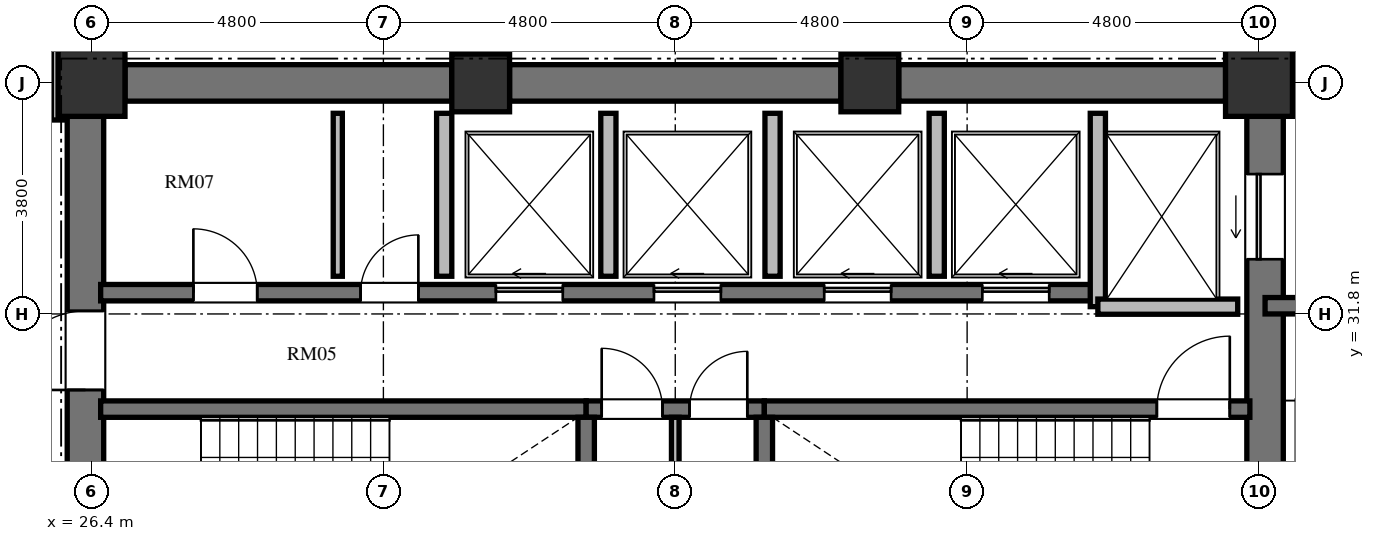
"""IFC4 building model, lengths in metres.
Left out: names, types, materials, properties, quantities, classifications, styles, units other than length and angle.
Written with IfcOpenShell. Run it as: python <this file> out.ifc"""

import sys

from ifc_helpers import new_model, si_unit, direction, frame, frame_2d, origin, origin_2d, place, context, subcontext, project, spatial, rectangle, extrude, element, fill, save


model = new_model("IFC4")
c1 = context("Model", 3, precision=1e-05, world=origin(), true_north=direction((0.0, 1.0)))
c2 = subcontext(c1, "Body", "Model", "MODEL_VIEW")
j1 = project(units=[si_unit("LENGTHUNIT", "METRE"), si_unit("PLANEANGLEUNIT", "RADIAN")], contexts=[c1])
p1 = place(None, origin())
s1 = spatial("IfcSite", under=j1, at=p1, CompositionType="ELEMENT")
p2 = place(p1, origin())
s2 = spatial("IfcBuilding", under=s1, at=p2, CompositionType="ELEMENT")
p3 = place(p2, frame((0.0, 0.0, 182.064)))
s3 = spatial("IfcBuildingStorey", under=s2, at=p3, CompositionType="ELEMENT", Elevation=182.064)
p4 = place(p3, frame((45.6, 35.6, 0.0), z_axis=(0.0, 0.0, 1.0), x_axis=(1.0, 0.0, 0.0)))
e1 = element("IfcColumn", 1, at=p4, inside=s3, PredefinedType="COLUMN", context=c2, shape_type="SweptSolid", body=[
    extrude(rectangle(XDim=1.1, YDim=1.1, at=origin_2d()), origin(), (0.0, 0.0, 1.0), 3.648),
])
for number, where, z_axis, x_axis in (
    (2, (39.2, 35.6, 0.0), (0.0, 0.0, 1.0), (1.0, 0.0, 0.0)),
    (3, (32.8, 35.6, 0.0), (0.0, 0.0, 1.0), (1.0, 0.0, 0.0)),
):
    element("IfcColumn", number, at=place(p3, frame(where, z_axis=z_axis, x_axis=x_axis)), inside=s3, PredefinedType="COLUMN", context=c2, shape_type="SweptSolid", body=[
        extrude(rectangle(XDim=0.95, YDim=0.95, at=origin_2d()), origin(), (0.0, 0.0, 1.0), 3.648),
    ])
p5 = place(p3, frame((26.4, 35.6, 0.0), z_axis=(0.0, 0.0, 1.0), x_axis=(1.0, 0.0, 0.0)))
e4 = element("IfcColumn", 4, at=p5, inside=s3, PredefinedType="COLUMN", context=c2, shape_type="SweptSolid", body=[
    extrude(rectangle(XDim=1.1, YDim=1.1, at=origin_2d()), origin(), (0.0, 0.0, 1.0), 3.648),
])
p6 = place(p3, frame((26.3, 20.95, 0.0), z_axis=(0.0, 0.0, 1.0), x_axis=(0.0, 1.0, 0.0)))
e5 = element("IfcWall", 5, at=p6, inside=s3, PredefinedType="SHEAR", context=c2, shape_type="SweptSolid", body=[
    extrude(rectangle(XDim=14.1, YDim=0.6, at=frame_2d((7.05, 0.0))), origin(), (0.0, 0.0, 1.0), 3.648),
])
p7 = place(p6, frame((6.5, 0.0, 0.0)))
e6 = element("IfcOpeningElement", 6, at=p7, cuts=e5, PredefinedType="OPENING", context=c2, shape_type="SweptSolid", body=[
    extrude(rectangle(XDim=1.2, YDim=2.15, at=frame_2d((0.6, 1.075))), frame((0.0, 0.31, 0.0), z_axis=(0.0, -1.0, 0.0), x_axis=(1.0, 0.0, 0.0)), (0.0, 0.0, 1.0), 0.62),
])
p8 = place(p6, frame((9.6, 0.0, 0.0)))
e7 = element("IfcOpeningElement", 7, at=p8, cuts=e5, PredefinedType="OPENING", context=c2, shape_type="SweptSolid", body=[
    extrude(rectangle(XDim=1.3, YDim=2.2, at=frame_2d((0.65, 1.1))), frame((0.0, 0.31, 0.0), z_axis=(0.0, -1.0, 0.0), x_axis=(1.0, 0.0, 0.0)), (0.0, 0.0, 1.0), 0.62),
])
p9 = place(p6, frame((3.26, 0.0, 0.0)))
e8 = element("IfcOpeningElement", 8, at=p9, cuts=e5, PredefinedType="OPENING", context=c2, shape_type="SweptSolid", body=[
    extrude(rectangle(XDim=1.3, YDim=2.2, at=frame_2d((0.65, 1.1))), frame((0.0, 0.31, 0.0), z_axis=(0.0, -1.0, 0.0), x_axis=(1.0, 0.0, 0.0)), (0.0, 0.0, 1.0), 0.62),
])
p10 = place(p3, frame((45.7, 20.95, 0.0), z_axis=(0.0, 0.0, 1.0), x_axis=(0.0, 1.0, 0.0)))
e9 = element("IfcWall", 9, at=p10, inside=s3, PredefinedType="SHEAR", context=c2, shape_type="SweptSolid", body=[
    extrude(rectangle(XDim=14.1, YDim=0.6, at=frame_2d((7.05, 0.0))), origin(), (0.0, 0.0, 1.0), 3.648),
])
p11 = place(p10, frame((11.75, 0.0, 0.0)))
e10 = element("IfcOpeningElement", 10, at=p11, cuts=e9, PredefinedType="OPENING", context=c2, shape_type="SweptSolid", body=[
    extrude(rectangle(XDim=1.4, YDim=2.3, at=frame_2d((0.7, 1.15))), frame((0.0, 0.31, 0.0), z_axis=(0.0, -1.0, 0.0), x_axis=(1.0, 0.0, 0.0)), (0.0, 0.0, 1.0), 0.62),
])
p12 = place(p10, frame((0.95, 0.0, 0.0)))
e11 = element("IfcOpeningElement", 11, at=p12, cuts=e9, PredefinedType="OPENING", context=c2, shape_type="SweptSolid", body=[
    extrude(rectangle(XDim=1.4, YDim=2.3, at=frame_2d((0.7, 1.15))), frame((0.0, 0.31, 0.0), z_axis=(0.0, -1.0, 0.0), x_axis=(1.0, 0.0, 0.0)), (0.0, 0.0, 1.0), 0.62),
])
p13 = place(p3, frame((26.95, 35.6, 0.0), z_axis=(0.0, 0.0, 1.0), x_axis=(1.0, 0.0, 0.0)))
e12 = element("IfcWall", 12, at=p13, inside=s3, PredefinedType="SHEAR", context=c2, shape_type="SweptSolid", body=[
    extrude(rectangle(XDim=5.375, YDim=0.6, at=frame_2d((2.688, 0.0))), origin(), (0.0, 0.0, 1.0), 3.648),
])
p14 = place(p3, frame((33.275, 35.6, 0.0), z_axis=(0.0, 0.0, 1.0), x_axis=(1.0, 0.0, 0.0)))
e13 = element("IfcWall", 13, at=p14, inside=s3, PredefinedType="SHEAR", context=c2, shape_type="SweptSolid", body=[
    extrude(rectangle(XDim=5.45, YDim=0.6, at=frame_2d((2.725, 0.0))), origin(), (0.0, 0.0, 1.0), 3.648),
])
p15 = place(p3, frame((39.675, 35.6, 0.0), z_axis=(0.0, 0.0, 1.0), x_axis=(1.0, 0.0, 0.0)))
e14 = element("IfcWall", 14, at=p15, inside=s3, PredefinedType="SHEAR", context=c2, shape_type="SweptSolid", body=[
    extrude(rectangle(XDim=5.375, YDim=0.6, at=frame_2d((2.688, 0.0))), origin(), (0.0, 0.0, 1.0), 3.648),
])
p16 = place(p3, frame((26.55, 30.235, 0.0), z_axis=(0.0, 0.0, 1.0), x_axis=(1.0, 0.0, 0.0)))
e15 = element("IfcWall", 15, at=p16, inside=s3, PredefinedType="SHEAR", context=c2, shape_type="SweptSolid", body=[
    extrude(rectangle(XDim=7.985, YDim=0.27, at=frame_2d((3.992, 0.0))), origin(), (0.0, 0.0, 1.0), 3.648),
])
p17 = place(p3, frame((34.535, 30.235, 0.0), z_axis=(0.0, 0.0, 1.0), x_axis=(1.0, 0.0, 0.0)))
e16 = element("IfcWall", 16, at=p17, inside=s3, PredefinedType="SHEAR", context=c2, shape_type="SweptSolid", body=[
    extrude(rectangle(XDim=2.93, YDim=0.27, at=frame_2d((1.465, 0.0))), origin(), (0.0, 0.0, 1.0), 3.648),
])
p18 = place(p17, frame((0.255, 0.0, 0.0)))
e17 = element("IfcOpeningElement", 17, at=p18, cuts=e16, PredefinedType="OPENING", context=c2, shape_type="SweptSolid", body=[
    extrude(rectangle(XDim=1.0, YDim=2.1, at=frame_2d((0.5, 1.05))), frame((0.0, 0.145, 0.0), z_axis=(0.0, -1.0, 0.0), x_axis=(1.0, 0.0, 0.0)), (0.0, 0.0, 1.0), 0.29),
])
p19 = place(p17, frame((1.7, 0.0, 0.0)))
e18 = element("IfcOpeningElement", 18, at=p19, cuts=e16, PredefinedType="OPENING", context=c2, shape_type="SweptSolid", body=[
    extrude(rectangle(XDim=0.95, YDim=2.1, at=frame_2d((0.475, 1.05))), frame((0.0, 0.145, 0.0), z_axis=(0.0, -1.0, 0.0), x_axis=(1.0, 0.0, 0.0)), (0.0, 0.0, 1.0), 0.29),
])
p20 = place(p3, frame((37.465, 30.235, 0.0), z_axis=(0.0, 0.0, 1.0), x_axis=(1.0, 0.0, 0.0)))
e19 = element("IfcWall", 19, at=p20, inside=s3, PredefinedType="SHEAR", context=c2, shape_type="SweptSolid", body=[
    extrude(rectangle(XDim=7.985, YDim=0.27, at=frame_2d((3.992, 0.0))), origin(), (0.0, 0.0, 1.0), 3.648),
])
p21 = place(p20, frame((6.455, 0.0, 0.0)))
e20 = element("IfcOpeningElement", 20, at=p21, cuts=e19, PredefinedType="OPENING", context=c2, shape_type="SweptSolid", body=[
    extrude(rectangle(XDim=1.2, YDim=2.15, at=frame_2d((0.6, 1.075))), frame((0.0, 0.145, 0.0), z_axis=(0.0, -1.0, 0.0), x_axis=(1.0, 0.0, 0.0)), (0.0, 0.0, 1.0), 0.29),
])
for number, where, z_axis, x_axis in (
    (21, (34.535, 26.02, 0.0), (0.0, 0.0, 1.0), (0.0, 1.0, 0.0)),
    (22, (37.465, 26.02, 0.0), (0.0, 0.0, 1.0), (0.0, 1.0, 0.0)),
):
    element("IfcWall", number, at=place(p3, frame(where, z_axis=z_axis, x_axis=x_axis)), inside=s3, PredefinedType="SHEAR", context=c2, shape_type="SweptSolid", body=[
        extrude(rectangle(XDim=4.08, YDim=0.27, at=frame_2d((2.04, 0.0))), origin(), (0.0, 0.0, 1.0), 3.648),
    ])
p22 = place(p3, frame((36.0, 26.02, 0.0), z_axis=(0.0, 0.0, 1.0), x_axis=(0.0, 1.0, 0.0)))
e23 = element("IfcWall", 23, at=p22, inside=s3, PredefinedType="PARTITIONING", context=c2, shape_type="SweptSolid", body=[
    extrude(rectangle(XDim=4.08, YDim=0.125, at=frame_2d((2.04, 0.0))), origin(), (0.0, 0.0, 1.0), 3.428),
])
p23 = place(p3, frame((26.55, 32.15, 0.0), z_axis=(0.0, 0.0, 1.0), x_axis=(1.0, 0.0, 0.0)))
e24 = element("IfcWall", 24, at=p23, inside=s3, PredefinedType="SHEAR", context=c2, shape_type="SweptSolid", body=[
    extrude(rectangle(XDim=16.4, YDim=0.27, at=frame_2d((8.2, 0.0))), origin(), (0.0, 0.0, 1.0), 3.648),
])
p24 = place(p23, frame((1.525, 0.0, 0.0)))
e25 = element("IfcOpeningElement", 25, at=p24, cuts=e24, PredefinedType="OPENING", context=c2, shape_type="SweptSolid", body=[
    extrude(rectangle(XDim=1.05, YDim=2.15, at=frame_2d((0.525, 1.075))), frame((0.0, 0.145, 0.0), z_axis=(0.0, -1.0, 0.0), x_axis=(1.0, 0.0, 0.0)), (0.0, 0.0, 1.0), 0.29),
])
p25 = place(p23, frame((4.275, 0.0, 0.0)))
e26 = element("IfcOpeningElement", 26, at=p25, cuts=e24, PredefinedType="OPENING", context=c2, shape_type="SweptSolid", body=[
    extrude(rectangle(XDim=0.95, YDim=2.1, at=frame_2d((0.475, 1.05))), frame((0.0, 0.145, 0.0), z_axis=(0.0, -1.0, 0.0), x_axis=(1.0, 0.0, 0.0)), (0.0, 0.0, 1.0), 0.29),
])
p26 = place(p23, frame((6.5, 0.0, 0.0)))
e27 = element("IfcOpeningElement", 27, at=p26, cuts=e24, PredefinedType="OPENING", context=c2, shape_type="SweptSolid", body=[
    extrude(rectangle(XDim=1.1, YDim=2.2, at=frame_2d((0.55, 1.1))), frame((0.0, 0.145, 0.0), z_axis=(0.0, -1.0, 0.0), x_axis=(1.0, 0.0, 0.0)), (0.0, 0.0, 1.0), 0.29),
])
p27 = place(p23, frame((9.1, 0.0, 0.0)))
e28 = element("IfcOpeningElement", 28, at=p27, cuts=e24, PredefinedType="OPENING", context=c2, shape_type="SweptSolid", body=[
    extrude(rectangle(XDim=1.1, YDim=2.2, at=frame_2d((0.55, 1.1))), frame((0.0, 0.145, 0.0), z_axis=(0.0, -1.0, 0.0), x_axis=(1.0, 0.0, 0.0)), (0.0, 0.0, 1.0), 0.29),
])
p28 = place(p23, frame((11.9, 0.0, 0.0)))
e29 = element("IfcOpeningElement", 29, at=p28, cuts=e24, PredefinedType="OPENING", context=c2, shape_type="SweptSolid", body=[
    extrude(rectangle(XDim=1.1, YDim=2.2, at=frame_2d((0.55, 1.1))), frame((0.0, 0.145, 0.0), z_axis=(0.0, -1.0, 0.0), x_axis=(1.0, 0.0, 0.0)), (0.0, 0.0, 1.0), 0.29),
])
p29 = place(p23, frame((14.5, 0.0, 0.0)))
e30 = element("IfcOpeningElement", 30, at=p29, cuts=e24, PredefinedType="OPENING", context=c2, shape_type="SweptSolid", body=[
    extrude(rectangle(XDim=1.1, YDim=2.2, at=frame_2d((0.55, 1.1))), frame((0.0, 0.145, 0.0), z_axis=(0.0, -1.0, 0.0), x_axis=(1.0, 0.0, 0.0)), (0.0, 0.0, 1.0), 0.29),
])
p30 = place(p3, frame((42.95, 31.92, 0.0), z_axis=(0.0, 0.0, 1.0), x_axis=(0.0, 1.0, 0.0)))
e31 = element("IfcWall", 31, at=p30, inside=s3, PredefinedType="SOLIDWALL", context=c2, shape_type="SweptSolid", body=[
    extrude(rectangle(XDim=3.18, YDim=0.25, at=frame_2d((1.59, 0.0))), origin(), (0.0, 0.0, 1.0), 3.428),
])
p31 = place(p3, frame((42.95, 31.92, 0.0), z_axis=(0.0, 0.0, 1.0), x_axis=(1.0, 0.0, 0.0)))
e32 = element("IfcWall", 32, at=p31, inside=s3, PredefinedType="SOLIDWALL", context=c2, shape_type="SweptSolid", body=[
    extrude(rectangle(XDim=2.3, YDim=0.25, at=frame_2d((1.15, 0.0))), origin(), (0.0, 0.0, 1.0), 3.428),
])
for number, where, z_axis, x_axis in (
    (33, (32.2, 32.42, 0.0), (0.0, 0.0, 1.0), (0.0, 1.0, 0.0)),
    (34, (34.9, 32.42, 0.0), (0.0, 0.0, 1.0), (0.0, 1.0, 0.0)),
    (35, (37.6, 32.42, 0.0), (0.0, 0.0, 1.0), (0.0, 1.0, 0.0)),
    (36, (40.3, 32.42, 0.0), (0.0, 0.0, 1.0), (0.0, 1.0, 0.0)),
):
    element("IfcWall", number, at=place(p3, frame(where, z_axis=z_axis, x_axis=x_axis)), inside=s3, PredefinedType="SOLIDWALL", context=c2, shape_type="SweptSolid", body=[
        extrude(rectangle(XDim=2.68, YDim=0.25, at=frame_2d((1.34, 0.0))), origin(), (0.0, 0.0, 1.0), 3.428),
    ])
p32 = place(p3, frame((30.45, 32.42, 0.0), z_axis=(0.0, 0.0, 1.0), x_axis=(0.0, 1.0, 0.0)))
e37 = element("IfcWall", 37, at=p32, inside=s3, PredefinedType="PARTITIONING", context=c2, shape_type="SweptSolid", body=[
    extrude(rectangle(XDim=2.68, YDim=0.15, at=frame_2d((1.34, 0.0))), origin(), (0.0, 0.0, 1.0), 3.428),
])
p33 = place(p3, frame((46.0, 35.98, 0.0), z_axis=(0.0, 0.0, 1.0), x_axis=(1.0, 0.0, 0.0)))
e38 = element("IfcWall", 38, at=p33, inside=s3, PredefinedType="SHEAR", context=c2, shape_type="SweptSolid", body=[
    extrude(rectangle(XDim=4.55, YDim=0.27, at=frame_2d((2.275, 0.0))), origin(), (0.0, 0.0, 1.0), 3.648),
])
p34 = place(p3, frame((45.7, 31.935, 0.0), z_axis=(0.0, 0.0, 1.0), x_axis=(1.0, 0.0, 0.0)))
e39 = element("IfcWall", 39, at=p34, inside=s3, PredefinedType="SHEAR", context=c2, shape_type="SweptSolid", body=[
    extrude(rectangle(XDim=4.715, YDim=0.27, at=frame_2d((2.357, 0.0))), origin(), (0.0, 0.0, 1.0), 3.648),
])
p35 = place(p3, frame((25.83, 36.21, 0.0), z_axis=(0.0, 0.0, 1.0), x_axis=(0.0, -1.0, 0.0)))
e40 = element("IfcWall", 40, at=p35, inside=s3, PredefinedType="PARTITIONING", context=c2, shape_type="SweptSolid", body=[
    extrude(rectangle(XDim=1.22, YDim=0.18, at=frame_2d((0.61, 0.0))), origin(), (0.0, 0.0, 1.0), 3.428),
])
p36 = place(p21, origin())
e41 = element("IfcDoor", 41, at=p36, inside=s3, OperationType="SINGLE_SWING_RIGHT", PredefinedType="DOOR", context=c2, shape_type="SweptSolid", body=[
    extrude(rectangle(XDim=1.2, YDim=2.15, at=frame_2d((0.6, 1.075))), frame((0.0, 0.025, 0.0), z_axis=(0.0, -1.0, 0.0), x_axis=(1.0, 0.0, 0.0)), (0.0, 0.0, 1.0), 0.05),
])
fill(e20, e41)
p37 = place(p18, origin())
e42 = element("IfcDoor", 42, at=p37, inside=s3, OperationType="SINGLE_SWING_LEFT", PredefinedType="DOOR", context=c2, shape_type="SweptSolid", body=[
    extrude(rectangle(XDim=1.0, YDim=2.1, at=frame_2d((0.5, 1.05))), frame((0.0, 0.025, 0.0), z_axis=(0.0, -1.0, 0.0), x_axis=(1.0, 0.0, 0.0)), (0.0, 0.0, 1.0), 0.05),
])
fill(e17, e42)
p38 = place(p19, origin())
e43 = element("IfcDoor", 43, at=p38, inside=s3, OperationType="SINGLE_SWING_RIGHT", PredefinedType="DOOR", context=c2, shape_type="SweptSolid", body=[
    extrude(rectangle(XDim=0.95, YDim=2.1, at=frame_2d((0.475, 1.05))), frame((0.0, 0.025, 0.0), z_axis=(0.0, -1.0, 0.0), x_axis=(1.0, 0.0, 0.0)), (0.0, 0.0, 1.0), 0.05),
])
fill(e18, e43)
p39 = place(p8, origin())
e44 = element("IfcDoor", 44, at=p39, inside=s3, OperationType="SINGLE_SWING_LEFT", PredefinedType="DOOR", context=c2, shape_type="SweptSolid", body=[
    extrude(rectangle(XDim=1.3, YDim=2.2, at=frame_2d((0.65, 1.1))), frame((0.0, 0.025, 0.0), z_axis=(0.0, -1.0, 0.0), x_axis=(1.0, 0.0, 0.0)), (0.0, 0.0, 1.0), 0.05),
])
fill(e7, e44)
p40 = place(p24, origin())
e45 = element("IfcDoor", 45, at=p40, inside=s3, OperationType="SINGLE_SWING_LEFT", PredefinedType="DOOR", context=c2, shape_type="SweptSolid", body=[
    extrude(rectangle(XDim=1.05, YDim=2.15, at=frame_2d((0.525, 1.075))), frame((0.0, 0.025, 0.0), z_axis=(0.0, -1.0, 0.0), x_axis=(1.0, 0.0, 0.0)), (0.0, 0.0, 1.0), 0.05),
])
fill(e25, e45)
p41 = place(p25, origin())
e46 = element("IfcDoor", 46, at=p41, inside=s3, OperationType="SINGLE_SWING_RIGHT", PredefinedType="DOOR", context=c2, shape_type="SweptSolid", body=[
    extrude(rectangle(XDim=0.95, YDim=2.1, at=frame_2d((0.475, 1.05))), frame((0.0, 0.025, 0.0), z_axis=(0.0, -1.0, 0.0), x_axis=(1.0, 0.0, 0.0)), (0.0, 0.0, 1.0), 0.05),
])
fill(e26, e46)
p42 = place(p26, origin())
e47 = element("IfcDoor", 47, at=p42, inside=s3, OperationType="SLIDING_TO_LEFT", PredefinedType="DOOR", context=c2, shape_type="SweptSolid", body=[
    extrude(rectangle(XDim=1.1, YDim=2.2, at=frame_2d((0.55, 1.1))), frame((0.0, 0.025, 0.0), z_axis=(0.0, -1.0, 0.0), x_axis=(1.0, 0.0, 0.0)), (0.0, 0.0, 1.0), 0.05),
])
fill(e27, e47)
p43 = place(p27, origin())
e48 = element("IfcDoor", 48, at=p43, inside=s3, OperationType="SLIDING_TO_LEFT", PredefinedType="DOOR", context=c2, shape_type="SweptSolid", body=[
    extrude(rectangle(XDim=1.1, YDim=2.2, at=frame_2d((0.55, 1.1))), frame((0.0, 0.025, 0.0), z_axis=(0.0, -1.0, 0.0), x_axis=(1.0, 0.0, 0.0)), (0.0, 0.0, 1.0), 0.05),
])
fill(e28, e48)
p44 = place(p28, origin())
e49 = element("IfcDoor", 49, at=p44, inside=s3, OperationType="SLIDING_TO_LEFT", PredefinedType="DOOR", context=c2, shape_type="SweptSolid", body=[
    extrude(rectangle(XDim=1.1, YDim=2.2, at=frame_2d((0.55, 1.1))), frame((0.0, 0.025, 0.0), z_axis=(0.0, -1.0, 0.0), x_axis=(1.0, 0.0, 0.0)), (0.0, 0.0, 1.0), 0.05),
])
fill(e29, e49)
p45 = place(p29, origin())
e50 = element("IfcDoor", 50, at=p45, inside=s3, OperationType="SLIDING_TO_LEFT", PredefinedType="DOOR", context=c2, shape_type="SweptSolid", body=[
    extrude(rectangle(XDim=1.1, YDim=2.2, at=frame_2d((0.55, 1.1))), frame((0.0, 0.025, 0.0), z_axis=(0.0, -1.0, 0.0), x_axis=(1.0, 0.0, 0.0)), (0.0, 0.0, 1.0), 0.05),
])
fill(e30, e50)
p46 = place(p11, origin())
e51 = element("IfcDoor", 51, at=p46, inside=s3, OperationType="SLIDING_TO_LEFT", PredefinedType="DOOR", context=c2, shape_type="SweptSolid", body=[
    extrude(rectangle(XDim=1.4, YDim=2.3, at=frame_2d((0.7, 1.15))), frame((0.0, 0.025, 0.0), z_axis=(0.0, -1.0, 0.0), x_axis=(1.0, 0.0, 0.0)), (0.0, 0.0, 1.0), 0.05),
])
fill(e10, e51)
save(model, sys.argv[1])
